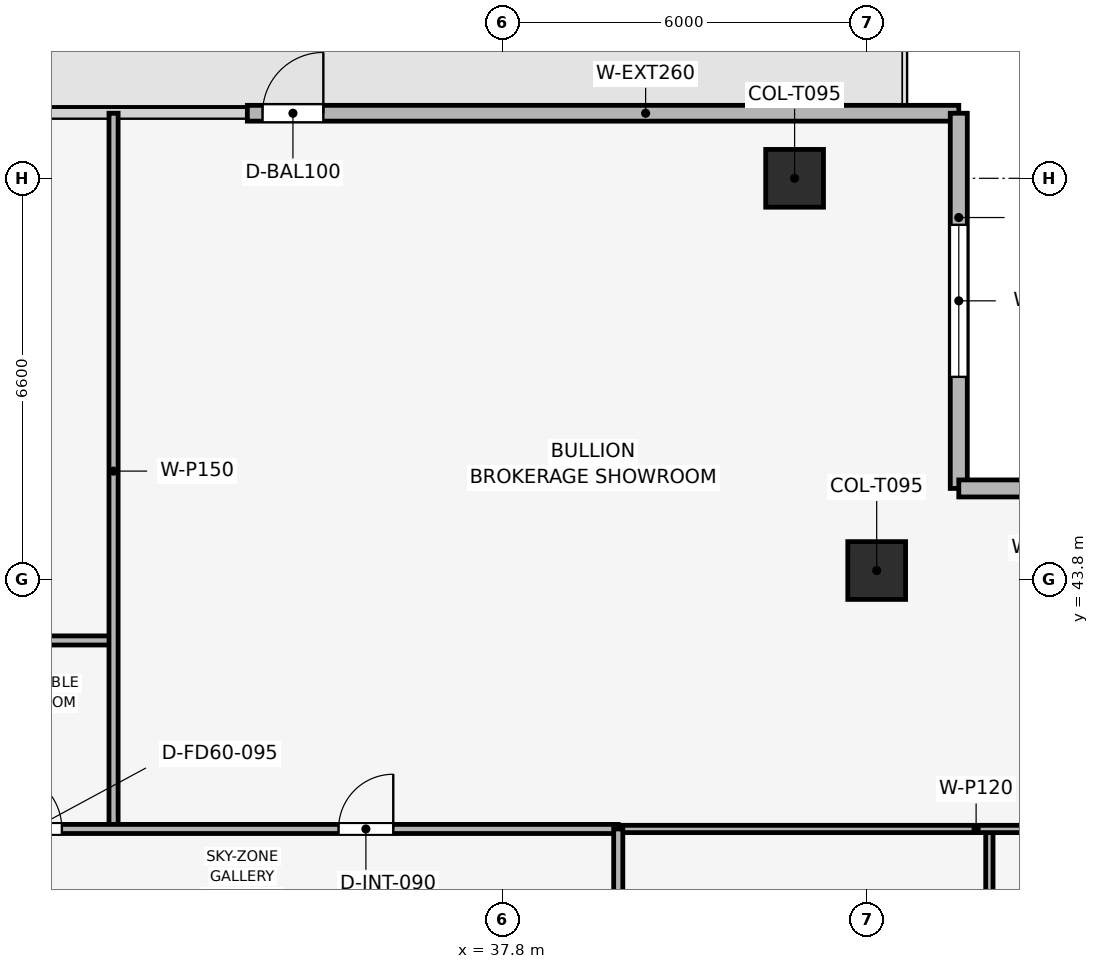
"""IFC4 building model, lengths in metres.
Left out: names, types, materials, properties, quantities, classifications, styles, units other than length and angle.
Written with IfcOpenShell. Run it as: python <this file> out.ifc"""

import sys

from ifc_helpers import new_model, si_unit, direction, frame, frame_2d, origin, origin_2d, place, context, subcontext, project, spatial, rectangle, extrude, element, fill, save


model = new_model("IFC4")
c1 = context("Model", 3, precision=1e-05, world=origin(), true_north=direction((0.0, 1.0)))
c2 = subcontext(c1, "Body", "Model", "MODEL_VIEW")
j1 = project(units=[si_unit("LENGTHUNIT", "METRE"), si_unit("PLANEANGLEUNIT", "RADIAN")], contexts=[c1])
p1 = place(None, origin())
s1 = spatial("IfcSite", under=j1, at=p1, CompositionType="ELEMENT")
p2 = place(p1, origin())
s2 = spatial("IfcBuilding", under=s1, at=p2, CompositionType="ELEMENT")
p3 = place(p2, frame((0.0, 0.0, 303.0)))
s3 = spatial("IfcBuildingStorey", under=s2, at=p3, CompositionType="ELEMENT", Elevation=303.0)
for number, where, z_axis, x_axis in (
    (1, (42.6, 50.4, 0.003), (0.0, 0.0, 1.0), (1.0, 0.0, 0.0)),
    (2, (43.95, 43.95, 0.003), (0.0, 0.0, 1.0), (1.0, 0.0, 0.0)),
):
    element("IfcColumn", number, at=place(p3, frame(where, z_axis=z_axis, x_axis=x_axis)), inside=s3, PredefinedType="COLUMN", context=c2, shape_type="SweptSolid", body=[
        extrude(rectangle(XDim=0.95, YDim=0.95, at=origin_2d()), origin(), (0.0, 0.0, 1.0), 3.504),
    ])
p4 = place(p3, frame((33.6, 51.47, 0.0), z_axis=(0.0, 0.0, 1.0), x_axis=(1.0, 0.0, 0.0)))
e3 = element("IfcWall", 3, at=p4, inside=s3, PredefinedType="SOLIDWALL", context=c2, shape_type="SweptSolid", body=[
    extrude(rectangle(XDim=11.7, YDim=0.26, at=frame_2d((5.85, 0.0))), origin(), (0.0, 0.0, 1.0), 3.51),
])
p5 = place(p4, frame((0.25, 0.0, 0.0)))
e4 = element("IfcOpeningElement", 4, at=p5, cuts=e3, PredefinedType="OPENING", context=c2, shape_type="SweptSolid", body=[
    extrude(rectangle(XDim=1.0, YDim=2.2, at=frame_2d((0.5, 1.1))), frame((0.0, 0.14, 0.0), z_axis=(0.0, -1.0, 0.0), x_axis=(1.0, 0.0, 0.0)), (0.0, 0.0, 1.0), 0.28),
])
p6 = place(p3, frame((45.3, 51.47, 0.0), z_axis=(0.0, 0.0, 1.0), x_axis=(0.0, -1.0, 0.0)))
e5 = element("IfcWall", 5, at=p6, inside=s3, PredefinedType="SOLIDWALL", context=c2, shape_type="SweptSolid", body=[
    extrude(rectangle(XDim=6.17, YDim=0.28, at=frame_2d((3.085, 0.0))), origin(), (0.0, 0.0, 1.0), 3.51),
])
p7 = place(p6, frame((1.835, 0.0, 0.9)))
e6 = element("IfcOpeningElement", 6, at=p7, cuts=e5, PredefinedType="OPENING", context=c2, shape_type="SweptSolid", body=[
    extrude(rectangle(XDim=2.5, YDim=1.9, at=frame_2d((1.25, 0.95))), frame((0.0, 0.15, 0.0), z_axis=(0.0, -1.0, 0.0), x_axis=(1.0, 0.0, 0.0)), (0.0, 0.0, 1.0), 0.3),
])
p8 = place(p3, frame((45.3, 45.3, 0.0), z_axis=(0.0, 0.0, 1.0), x_axis=(1.0, 0.0, 0.0)))
e7 = element("IfcWall", 7, at=p8, inside=s3, PredefinedType="SOLIDWALL", context=c2, shape_type="SweptSolid", body=[
    extrude(rectangle(XDim=6.17, YDim=0.28, at=frame_2d((3.085, 0.0))), origin(), (0.0, 0.0, 1.0), 3.51),
])
p9 = place(p8, frame((1.835, 0.0, 0.9)))
e8 = element("IfcOpeningElement", 8, at=p9, cuts=e7, PredefinedType="OPENING", context=c2, shape_type="SweptSolid", body=[
    extrude(rectangle(XDim=2.5, YDim=1.9, at=frame_2d((1.25, 0.95))), frame((0.0, 0.15, 0.0), z_axis=(0.0, -1.0, 0.0), x_axis=(1.0, 0.0, 0.0)), (0.0, 0.0, 1.0), 0.3),
])
p10 = place(p3, frame((23.0, 42.8, 0.0), z_axis=(0.0, 0.0, 1.0), x_axis=(1.0, 0.0, 0.0)))
e9 = element("IfcWall", 9, at=p10, inside=s3, PredefinedType="PARTITIONING", context=c2, shape_type="SweptSolid", body=[
    extrude(rectangle(XDim=8.4, YDim=0.15, at=frame_2d((4.2, 0.0))), origin(), (0.0, 0.0, 1.0), 3.095),
])
p11 = place(p3, frame((31.4, 39.7, 0.0), z_axis=(0.0, 0.0, 1.0), x_axis=(0.0, 1.0, 0.0)))
e10 = element("IfcWall", 10, at=p11, inside=s3, PredefinedType="PARTITIONING", context=c2, shape_type="SweptSolid", body=[
    extrude(rectangle(XDim=11.77, YDim=0.15, at=frame_2d((5.885, 0.0))), origin(), (0.0, 0.0, 1.0), 3.135),
])
p12 = place(p3, frame((45.803, 31.295, 0.0), z_axis=(0.0, 0.0, 1.0), x_axis=(0.0, 1.0, 0.0)))
e11 = element("IfcWall", 11, at=p12, inside=s3, PredefinedType="PARTITIONING", context=c2, shape_type="SweptSolid", body=[
    extrude(rectangle(XDim=8.405, YDim=0.12, at=frame_2d((4.203, 0.0))), origin(), (0.0, 0.0, 1.0), 3.095),
])
p13 = place(p12, frame((4.049, 0.0, 0.0)))
e12 = element("IfcOpeningElement", 12, at=p13, cuts=e11, PredefinedType="OPENING", context=c2, shape_type="SweptSolid", body=[
    extrude(rectangle(XDim=0.9, YDim=2.1, at=frame_2d((0.45, 1.05))), frame((0.0, 0.07, 0.0), z_axis=(0.0, -1.0, 0.0), x_axis=(1.0, 0.0, 0.0)), (0.0, 0.0, 1.0), 0.14),
])
p14 = place(p3, frame((39.7, 39.7, 0.0), z_axis=(0.0, 0.0, 1.0), x_axis=(1.0, 0.0, 0.0)))
e13 = element("IfcWall", 13, at=p14, inside=s3, PredefinedType="PARTITIONING", context=c2, shape_type="SweptSolid", body=[
    extrude(rectangle(XDim=11.77, YDim=0.12, at=frame_2d((5.885, 0.0))), origin(), (0.0, 0.0, 1.0), 3.095),
])
p15 = place(p3, frame((17.9, 39.7, 0.0), z_axis=(0.0, 0.0, 1.0), x_axis=(1.0, 0.0, 0.0)))
e14 = element("IfcWall", 14, at=p15, inside=s3, PredefinedType="PARTITIONING", context=c2, shape_type="SweptSolid", body=[
    extrude(rectangle(XDim=21.8, YDim=0.15, at=frame_2d((10.9, 0.0))), origin(), (0.0, 0.0, 1.0), 3.095),
])
p16 = place(p15, frame((2.1, 0.0, 0.0)))
e15 = element("IfcOpeningElement", 15, at=p16, cuts=e14, PredefinedType="OPENING", context=c2, shape_type="SweptSolid", body=[
    extrude(rectangle(XDim=0.9, YDim=2.1, at=frame_2d((0.45, 1.05))), frame((0.0, 0.085, 0.0), z_axis=(0.0, -1.0, 0.0), x_axis=(1.0, 0.0, 0.0)), (0.0, 0.0, 1.0), 0.17),
])
p17 = place(p15, frame((6.05, 0.0, 0.0)))
e16 = element("IfcOpeningElement", 16, at=p17, cuts=e14, PredefinedType="OPENING", context=c2, shape_type="SweptSolid", body=[
    extrude(rectangle(XDim=0.9, YDim=2.1, at=frame_2d((0.45, 1.05))), frame((0.0, 0.085, 0.0), z_axis=(0.0, -1.0, 0.0), x_axis=(1.0, 0.0, 0.0)), (0.0, 0.0, 1.0), 0.17),
])
p18 = place(p15, frame((8.95, 0.0, 0.0)))
e17 = element("IfcOpeningElement", 17, at=p18, cuts=e14, PredefinedType="OPENING", context=c2, shape_type="SweptSolid", body=[
    extrude(rectangle(XDim=0.9, YDim=2.1, at=frame_2d((0.45, 1.05))), frame((0.0, 0.085, 0.0), z_axis=(0.0, -1.0, 0.0), x_axis=(1.0, 0.0, 0.0)), (0.0, 0.0, 1.0), 0.17),
])
p19 = place(p15, frame((11.7, 0.0, 0.0)))
e18 = element("IfcOpeningElement", 18, at=p19, cuts=e14, PredefinedType="OPENING", context=c2, shape_type="SweptSolid", body=[
    extrude(rectangle(XDim=0.95, YDim=2.1, at=frame_2d((0.475, 1.05))), frame((0.0, 0.085, 0.0), z_axis=(0.0, -1.0, 0.0), x_axis=(1.0, 0.0, 0.0)), (0.0, 0.0, 1.0), 0.17),
])
p20 = place(p15, frame((17.2, 0.0, 0.0)))
e19 = element("IfcOpeningElement", 19, at=p20, cuts=e14, PredefinedType="OPENING", context=c2, shape_type="SweptSolid", body=[
    extrude(rectangle(XDim=0.9, YDim=2.1, at=frame_2d((0.45, 1.05))), frame((0.0, 0.085, 0.0), z_axis=(0.0, -1.0, 0.0), x_axis=(1.0, 0.0, 0.0)), (0.0, 0.0, 1.0), 0.17),
])
p21 = place(p3, frame((39.7, 24.4, 0.0), z_axis=(0.0, 0.0, 1.0), x_axis=(0.0, 1.0, 0.0)))
e20 = element("IfcWall", 20, at=p21, inside=s3, PredefinedType="PARTITIONING", context=c2, shape_type="SweptSolid", body=[
    extrude(rectangle(XDim=15.3, YDim=0.15, at=frame_2d((7.65, 0.0))), origin(), (0.0, 0.0, 1.0), 3.095),
])
p22 = place(p21, frame((0.7, 0.0, 0.0)))
e21 = element("IfcOpeningElement", 21, at=p22, cuts=e20, PredefinedType="OPENING", context=c2, shape_type="SweptSolid", body=[
    extrude(rectangle(XDim=0.9, YDim=2.1, at=frame_2d((0.45, 1.05))), frame((0.0, 0.085, 0.0), z_axis=(0.0, -1.0, 0.0), x_axis=(1.0, 0.0, 0.0)), (0.0, 0.0, 1.0), 0.17),
])
p23 = place(p21, frame((4.148, 0.0, 0.0)))
e22 = element("IfcOpeningElement", 22, at=p23, cuts=e20, PredefinedType="OPENING", context=c2, shape_type="SweptSolid", body=[
    extrude(rectangle(XDim=0.9, YDim=2.1, at=frame_2d((0.45, 1.05))), frame((0.0, 0.085, 0.0), z_axis=(0.0, -1.0, 0.0), x_axis=(1.0, 0.0, 0.0)), (0.0, 0.0, 1.0), 0.17),
])
p24 = place(p21, frame((10.648, 0.0, 0.0)))
e23 = element("IfcOpeningElement", 23, at=p24, cuts=e20, PredefinedType="OPENING", context=c2, shape_type="SweptSolid", body=[
    extrude(rectangle(XDim=0.9, YDim=2.1, at=frame_2d((0.45, 1.05))), frame((0.0, 0.085, 0.0), z_axis=(0.0, -1.0, 0.0), x_axis=(1.0, 0.0, 0.0)), (0.0, 0.0, 1.0), 0.17),
])
p25 = place(p5, origin())
e24 = element("IfcDoor", 24, at=p25, inside=s3, OperationType="SINGLE_SWING_RIGHT", PredefinedType="DOOR", context=c2, shape_type="SweptSolid", body=[
    extrude(rectangle(XDim=1.0, YDim=2.2, at=frame_2d((0.5, 1.1))), frame((0.0, 0.025, 0.0), z_axis=(0.0, -1.0, 0.0), x_axis=(1.0, 0.0, 0.0)), (0.0, 0.0, 1.0), 0.05),
])
fill(e4, e24)
p26 = place(p7, origin())
e25 = element("IfcWindow", 25, at=p26, inside=s3, PartitioningType="SINGLE_PANEL", PredefinedType="WINDOW", context=c2, shape_type="SweptSolid", body=[
    extrude(rectangle(XDim=2.5, YDim=1.9, at=frame_2d((1.25, 0.95))), frame((0.0, 0.03, 0.0), z_axis=(0.0, -1.0, 0.0), x_axis=(1.0, 0.0, 0.0)), (0.0, 0.0, 1.0), 0.06),
])
fill(e6, e25)
p27 = place(p19, origin())
e26 = element("IfcDoor", 26, at=p27, inside=s3, OperationType="SINGLE_SWING_LEFT", PredefinedType="DOOR", context=c2, shape_type="SweptSolid", body=[
    extrude(rectangle(XDim=0.95, YDim=2.1, at=frame_2d((0.475, 1.05))), frame((0.0, 0.025, 0.0), z_axis=(0.0, -1.0, 0.0), x_axis=(1.0, 0.0, 0.0)), (0.0, 0.0, 1.0), 0.05),
])
fill(e18, e26)
p28 = place(p20, origin())
e27 = element("IfcDoor", 27, at=p28, inside=s3, OperationType="SINGLE_SWING_RIGHT", PredefinedType="DOOR", context=c2, shape_type="SweptSolid", body=[
    extrude(rectangle(XDim=0.9, YDim=2.1, at=frame_2d((0.45, 1.05))), frame((0.0, 0.025, 0.0), z_axis=(0.0, -1.0, 0.0), x_axis=(1.0, 0.0, 0.0)), (0.0, 0.0, 1.0), 0.05),
])
fill(e19, e27)
save(model, sys.argv[1])
